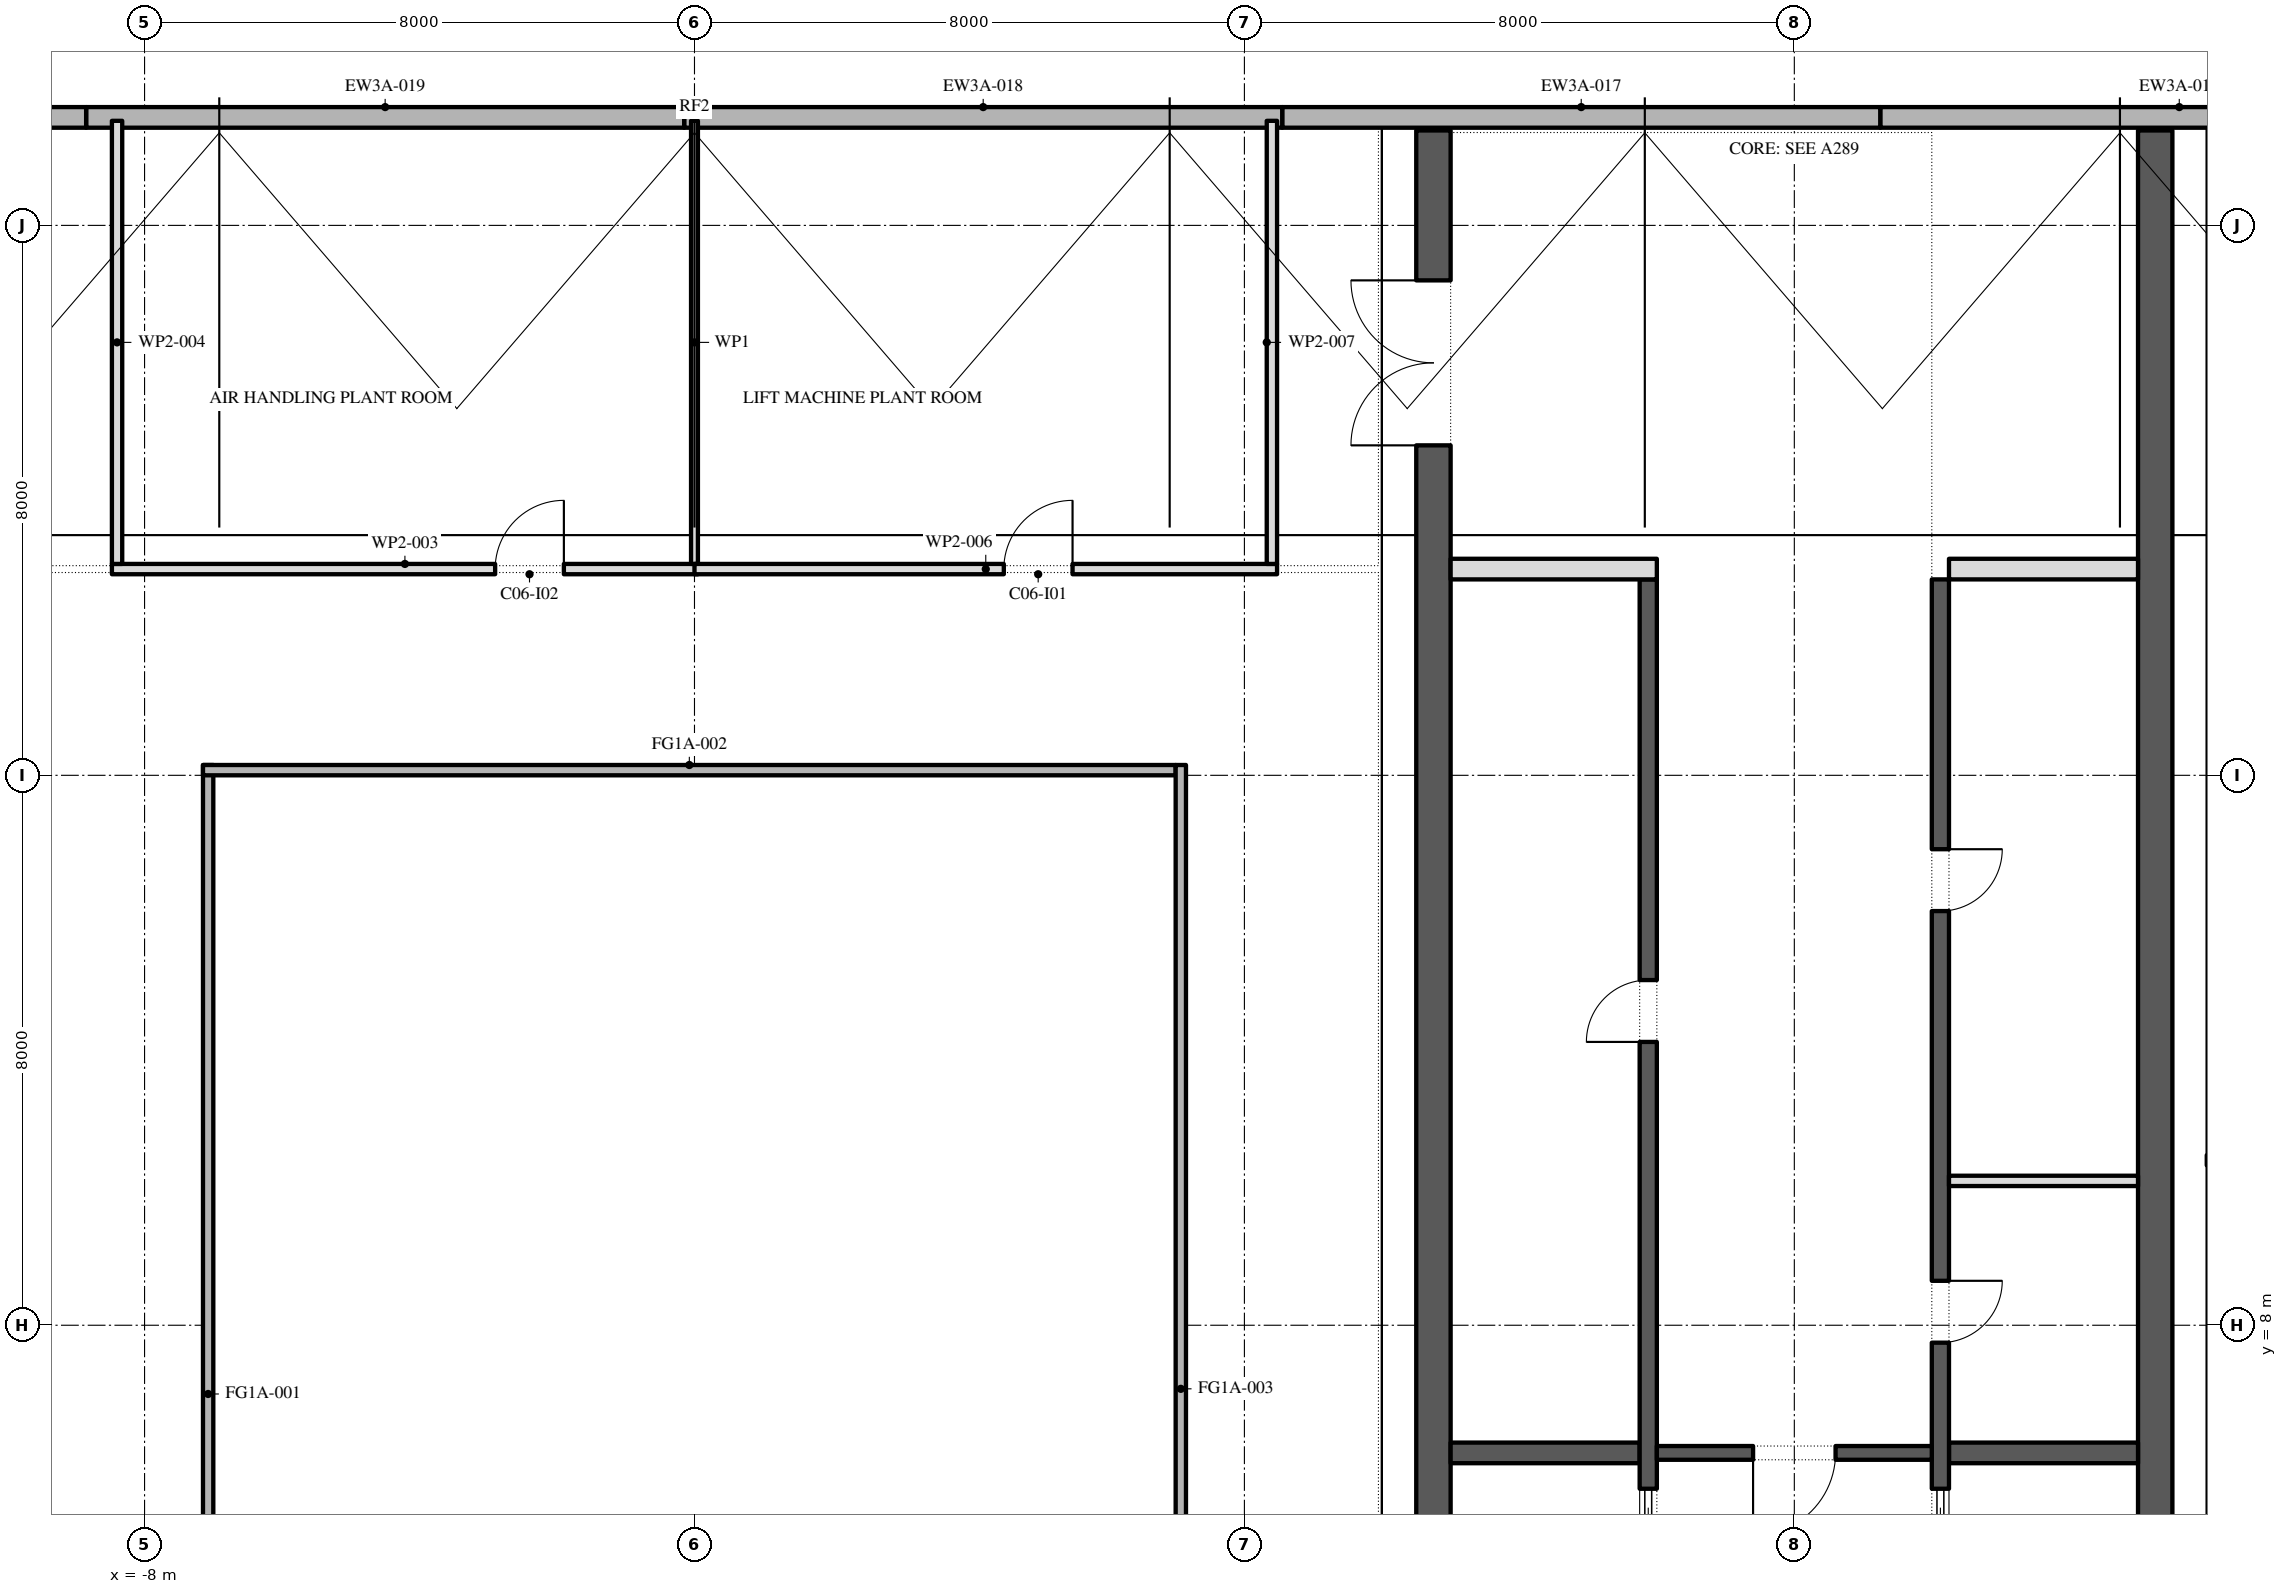
"""IFC4 building model, lengths in metres.
Left out: names, types, materials, properties, quantities, classifications, styles, units other than length and angle.
Written with IfcOpenShell. Run it as: python <this file> out.ifc"""

import sys

from ifc_helpers import new_model, si_unit, direction, frame, frame_2d, origin, place, context, subcontext, project, spatial, polyline, rectangle, outline, extrude, element, fill, save


model = new_model("IFC4")
c1 = context("Model", 3, precision=1e-05, world=origin(), true_north=direction((0.0, 1.0)))
c2 = subcontext(c1, "Body", "Model", "MODEL_VIEW")
j1 = project(units=[si_unit("LENGTHUNIT", "METRE"), si_unit("PLANEANGLEUNIT", "RADIAN")], contexts=[c1])
p1 = place(None, origin())
s1 = spatial("IfcSite", under=j1, at=p1, CompositionType="ELEMENT")
p2 = place(p1, origin())
s2 = spatial("IfcBuilding", under=s1, at=p2, CompositionType="ELEMENT")
p3 = place(p2, frame((0.0, 0.0, 390.0)))
s3 = spatial("IfcBuildingStorey", under=s2, at=p3, CompositionType="ELEMENT", Elevation=390.0)
p4 = place(p3, frame((-7.075, -2.15, 0.0), z_axis=(0.0, 0.0, 1.0), x_axis=(0.0, 1.0, 0.0)))
e1 = element("IfcWall", 1, at=p4, inside=s3, PredefinedType="STANDARD", context=c2, shape_type="SweptSolid", body=[
    extrude(rectangle(XDim=18.3, YDim=0.15, at=frame_2d((9.15, 0.0))), origin(), (0.0, 0.0, 1.0), 4.0),
])
p5 = place(p3, frame((-7.15, 16.075, 0.0), z_axis=(0.0, 0.0, 1.0), x_axis=(1.0, 0.0, 0.0)))
e2 = element("IfcWall", 2, at=p5, inside=s3, PredefinedType="STANDARD", context=c2, shape_type="SweptSolid", body=[
    extrude(rectangle(XDim=14.15, YDim=0.15, at=frame_2d((7.075, 0.0))), origin(), (0.0, 0.0, 1.0), 4.0),
])
p6 = place(p3, frame((7.075, 16.15, 0.0), z_axis=(0.0, 0.0, 1.0), x_axis=(0.0, -1.0, 0.0)))
e3 = element("IfcWall", 3, at=p6, inside=s3, PredefinedType="STANDARD", context=c2, shape_type="SweptSolid", body=[
    extrude(rectangle(XDim=18.15, YDim=0.15, at=frame_2d((9.075, 0.0))), origin(), (0.0, 0.0, 1.0), 4.0),
])
for number, where, z_axis, x_axis in (
    (4, (25.95, 25.571, 0.0), (0.0, 0.0, 1.0), (-1.0, 0.0, 0.0)),
    (5, (17.25, 25.571, 0.0), (0.0, 0.0, 1.0), (-1.0, 0.0, 0.0)),
    (6, (8.55, 25.571, 0.0), (0.0, 0.0, 1.0), (-1.0, 0.0, 0.0)),
):
    element("IfcWall", number, at=place(p3, frame(where, z_axis=z_axis, x_axis=x_axis)), inside=s3, PredefinedType="STANDARD", context=c2, shape_type="SweptSolid", body=[
        extrude(rectangle(XDim=8.7, YDim=0.3, at=frame_2d((4.35, 0.0))), origin(), (0.0, 0.0, 1.0), 2.2),
    ])
p7 = place(p3, frame((-0.15, 25.571, 0.0), z_axis=(0.0, 0.0, 1.0), x_axis=(-1.0, 0.0, 0.0)))
e7 = element("IfcWall", 7, at=p7, inside=s3, PredefinedType="STANDARD", context=c2, shape_type="SweptSolid", body=[
    extrude(rectangle(XDim=8.7, YDim=0.3, at=frame_2d((4.35, 0.0))), origin(), (0.0, 0.0, 1.0), 2.2),
])
p8 = place(p3, frame((-8.85, 25.571, 0.0), z_axis=(0.0, 0.0, 1.0), x_axis=(-1.0, 0.0, 0.0)))
e8 = element("IfcWall", 8, at=p8, inside=s3, PredefinedType="STANDARD", context=c2, shape_type="SweptSolid", body=[
    extrude(rectangle(XDim=8.7, YDim=0.3, at=frame_2d((4.35, 0.0))), origin(), (0.0, 0.0, 1.0), 2.2),
])
p9 = place(p3, frame((21.25, -2.45, 0.0), z_axis=(0.0, 0.0, 1.0), x_axis=(0.0, 1.0, 0.0)))
e9 = element("IfcWall", 9, at=p9, inside=s3, PredefinedType="SHEAR", context=c2, shape_type="SweptSolid", body=[
    extrude(outline(polyline([(0.0, 0.0), (27.831, 0.0), (27.831, 0.754), (23.018, 4.0), (0.0, 4.0), (0.0, 0.0)])), frame((0.0, 0.25, 0.0), z_axis=(0.0, -1.0, 0.0), x_axis=(1.0, 0.0, 0.0)), (0.0, 0.0, 1.0), 0.5),
])
p10 = place(p9, frame((5.05, 0.0, 0.0)))
e10 = element("IfcOpeningElement", 10, at=p10, cuts=e9, PredefinedType="OPENING", context=c2, shape_type="SweptSolid", body=[
    extrude(rectangle(XDim=1.2, YDim=2.1, at=frame_2d((0.6, 1.05))), frame((0.0, 0.26, 0.0), z_axis=(0.0, -1.0, 0.0), x_axis=(1.0, 0.0, 0.0)), (0.0, 0.0, 1.0), 0.52),
])
p11 = place(p3, frame((10.75, -2.45, 0.0), z_axis=(0.0, 0.0, 1.0), x_axis=(0.0, 1.0, 0.0)))
e11 = element("IfcWall", 11, at=p11, inside=s3, PredefinedType="SHEAR", context=c2, shape_type="SweptSolid", body=[
    extrude(outline(polyline([(0.0, 0.0), (27.831, 0.0), (27.831, 0.754), (23.018, 4.0), (0.0, 4.0), (0.0, 0.0)])), frame((0.0, 0.25, 0.0), z_axis=(0.0, -1.0, 0.0), x_axis=(1.0, 0.0, 0.0)), (0.0, 0.0, 1.0), 0.5),
])
p12 = place(p11, frame((23.25, 0.0, 0.0)))
e12 = element("IfcOpeningElement", 12, at=p12, cuts=e11, PredefinedType="OPENING", context=c2, shape_type="SweptSolid", body=[
    extrude(rectangle(XDim=2.4, YDim=2.1, at=frame_2d((1.2, 1.05))), frame((0.0, 0.26, 0.0), z_axis=(0.0, -1.0, 0.0), x_axis=(1.0, 0.0, 0.0)), (0.0, 0.0, 1.0), 0.52),
])
p13 = place(p11, frame((1.087, 0.0, 0.0)))
e13 = element("IfcOpeningElement", 13, at=p13, cuts=e11, PredefinedType="OPENING", context=c2, shape_type="SweptSolid", body=[
    extrude(rectangle(XDim=0.9, YDim=2.1, at=frame_2d((0.45, 1.05))), frame((0.0, 0.26, 0.0), z_axis=(0.0, -1.0, 0.0), x_axis=(1.0, 0.0, 0.0)), (0.0, 0.0, 1.0), 0.52),
])
p14 = place(p11, frame((4.262, 0.0, 0.0)))
e14 = element("IfcOpeningElement", 14, at=p14, cuts=e11, PredefinedType="OPENING", context=c2, shape_type="SweptSolid", body=[
    extrude(rectangle(XDim=1.0, YDim=2.1, at=frame_2d((0.5, 1.05))), frame((0.0, 0.26, 0.0), z_axis=(0.0, -1.0, 0.0), x_axis=(1.0, 0.0, 0.0)), (0.0, 0.0, 1.0), 0.52),
])
p15 = place(p3, frame((18.25, 6.143, 0.0), z_axis=(0.0, 0.0, 1.0), x_axis=(1.0, 0.0, 0.0)))
e15 = element("IfcWall", 15, at=p15, inside=s3, PredefinedType="SHEAR", context=c2, shape_type="SweptSolid", body=[
    extrude(rectangle(XDim=2.75, YDim=0.3, at=frame_2d((1.375, 0.0))), origin(), (0.0, 0.0, 1.0), 4.0),
])
p16 = place(p3, frame((18.125, 4.15, 0.0), z_axis=(0.0, 0.0, 1.0), x_axis=(0.0, 1.0, 0.0)))
e16 = element("IfcWall", 16, at=p16, inside=s3, PredefinedType="SHEAR", context=c2, shape_type="SweptSolid", body=[
    extrude(rectangle(XDim=14.7, YDim=0.25, at=frame_2d((7.35, 0.0))), origin(), (0.0, 0.0, 1.0), 4.0),
])
p17 = place(p16, frame((3.596, 0.0, 0.0)))
e17 = element("IfcOpeningElement", 17, at=p17, cuts=e16, PredefinedType="OPENING", context=c2, shape_type="SweptSolid", body=[
    extrude(rectangle(XDim=0.9, YDim=2.1, at=frame_2d((0.45, 1.05))), frame((0.0, 0.135, 0.0), z_axis=(0.0, -1.0, 0.0), x_axis=(1.0, 0.0, 0.0)), (0.0, 0.0, 1.0), 0.27),
])
p18 = place(p16, frame((9.875, 0.0, 0.0)))
e18 = element("IfcOpeningElement", 18, at=p18, cuts=e16, PredefinedType="OPENING", context=c2, shape_type="SweptSolid", body=[
    extrude(rectangle(XDim=0.9, YDim=2.1, at=frame_2d((0.45, 1.05))), frame((0.0, 0.135, 0.0), z_axis=(0.0, -1.0, 0.0), x_axis=(1.0, 0.0, 0.0)), (0.0, 0.0, 1.0), 0.27),
])
p19 = place(p16, frame((0.371, 0.0, 0.0)))
e19 = element("IfcOpeningElement", 19, at=p19, cuts=e16, PredefinedType="OPENING", context=c2, shape_type="SweptSolid", body=[
    extrude(rectangle(XDim=1.1, YDim=2.1, at=frame_2d((0.55, 1.05))), frame((0.0, 0.135, 0.0), z_axis=(0.0, -1.0, 0.0), x_axis=(1.0, 0.0, 0.0)), (0.0, 0.0, 1.0), 0.27),
])
p20 = place(p3, frame((18.25, 19.0, 0.0), z_axis=(0.0, 0.0, 1.0), x_axis=(1.0, 0.0, 0.0)))
e20 = element("IfcWall", 20, at=p20, inside=s3, PredefinedType="PARTITIONING", context=c2, shape_type="SweptSolid", body=[
    extrude(rectangle(XDim=2.75, YDim=0.3, at=frame_2d((1.375, 0.0))), origin(), (0.0, 0.0, 1.0), 4.0),
])
p21 = place(p3, frame((18.25, 10.1, 0.0), z_axis=(0.0, 0.0, 1.0), x_axis=(1.0, 0.0, 0.0)))
e21 = element("IfcWall", 21, at=p21, inside=s3, PredefinedType="PARTITIONING", context=c2, shape_type="SweptSolid", body=[
    extrude(rectangle(XDim=2.75, YDim=0.15, at=frame_2d((1.375, 0.0))), origin(), (0.0, 0.0, 1.0), 4.0),
])
p22 = place(p3, frame((11.0, 6.143, 0.0), z_axis=(0.0, 0.0, 1.0), x_axis=(1.0, 0.0, 0.0)))
e22 = element("IfcWall", 22, at=p22, inside=s3, PredefinedType="SHEAR", context=c2, shape_type="SweptSolid", body=[
    extrude(rectangle(XDim=2.75, YDim=0.3, at=frame_2d((1.375, 0.0))), origin(), (0.0, 0.0, 1.0), 4.0),
])
p23 = place(p3, frame((13.875, -2.45, 0.0), z_axis=(0.0, 0.0, 1.0), x_axis=(0.0, 1.0, 0.0)))
e23 = element("IfcWall", 23, at=p23, inside=s3, PredefinedType="SHEAR", context=c2, shape_type="SweptSolid", body=[
    extrude(rectangle(XDim=21.3, YDim=0.25, at=frame_2d((10.65, 0.0))), origin(), (0.0, 0.0, 1.0), 4.0),
])
p24 = place(p23, frame((14.571, 0.0, 0.0)))
e24 = element("IfcOpeningElement", 24, at=p24, cuts=e23, PredefinedType="OPENING", context=c2, shape_type="SweptSolid", body=[
    extrude(rectangle(XDim=0.9, YDim=2.1, at=frame_2d((0.45, 1.05))), frame((0.0, 0.135, 0.0), z_axis=(0.0, -1.0, 0.0), x_axis=(1.0, 0.0, 0.0)), (0.0, 0.0, 1.0), 0.27),
])
p25 = place(p23, frame((6.971, 0.0, 0.0)))
e25 = element("IfcOpeningElement", 25, at=p25, cuts=e23, PredefinedType="OPENING", context=c2, shape_type="SweptSolid", body=[
    extrude(rectangle(XDim=1.1, YDim=2.1, at=frame_2d((0.55, 1.05))), frame((0.0, 0.135, 0.0), z_axis=(0.0, -1.0, 0.0), x_axis=(1.0, 0.0, 0.0)), (0.0, 0.0, 1.0), 0.27),
])
p26 = place(p3, frame((11.0, 19.0, 0.0), z_axis=(0.0, 0.0, 1.0), x_axis=(1.0, 0.0, 0.0)))
e26 = element("IfcWall", 26, at=p26, inside=s3, PredefinedType="PARTITIONING", context=c2, shape_type="SweptSolid", body=[
    extrude(rectangle(XDim=3.0, YDim=0.3, at=frame_2d((1.5, 0.0))), origin(), (0.0, 0.0, 1.0), 4.0),
])
p27 = place(p3, frame((14.0, 6.143, 0.0), z_axis=(0.0, 0.0, 1.0), x_axis=(1.0, 0.0, 0.0)))
e27 = element("IfcWall", 27, at=p27, inside=s3, PredefinedType="SHEAR", context=c2, shape_type="SweptSolid", body=[
    extrude(rectangle(XDim=4.0, YDim=0.2, at=frame_2d((2.0, 0.0))), origin(), (0.0, 0.0, 1.0), 4.0),
])
p28 = place(p27, frame((1.4, 0.0, 0.0)))
e28 = element("IfcOpeningElement", 28, at=p28, cuts=e27, PredefinedType="OPENING", context=c2, shape_type="SweptSolid", body=[
    extrude(rectangle(XDim=1.2, YDim=2.1, at=frame_2d((0.6, 1.05))), frame((0.0, 0.11, 0.0), z_axis=(0.0, -1.0, 0.0), x_axis=(1.0, 0.0, 0.0)), (0.0, 0.0, 1.0), 0.22),
])
p29 = place(p3, frame((-8.475, 19.0, 0.0), z_axis=(0.0, 0.0, 1.0), x_axis=(1.0, 0.0, 0.0)))
e29 = element("IfcWall", 29, at=p29, inside=s3, PredefinedType="PARTITIONING", context=c2, shape_type="SweptSolid", body=[
    extrude(rectangle(XDim=8.525, YDim=0.15, at=frame_2d((4.263, 0.0))), origin(), (0.0, 0.0, 1.0), 4.0),
])
p30 = place(p29, frame((5.575, 0.0, 0.0)))
e30 = element("IfcOpeningElement", 30, at=p30, cuts=e29, PredefinedType="OPENING", context=c2, shape_type="SweptSolid", body=[
    extrude(rectangle(XDim=1.0, YDim=2.1, at=frame_2d((0.5, 1.05))), frame((0.0, 0.085, 0.0), z_axis=(0.0, -1.0, 0.0), x_axis=(1.0, 0.0, 0.0)), (0.0, 0.0, 1.0), 0.17),
])
p31 = place(p3, frame((-8.4, 25.521, 0.0), z_axis=(0.0, 0.0, 1.0), x_axis=(0.0, -1.0, 0.0)))
e31 = element("IfcWall", 31, at=p31, inside=s3, PredefinedType="PARTITIONING", context=c2, shape_type="SweptSolid", body=[
    extrude(rectangle(XDim=6.446, YDim=0.15, at=frame_2d((3.223, 0.0))), origin(), (0.0, 0.0, 1.0), 4.0),
])
p32 = place(p3, frame((0.0, 19.075, 0.0), z_axis=(0.0, 0.0, 1.0), x_axis=(0.0, 1.0, 0.0)))
e32 = element("IfcWall", 32, at=p32, inside=s3, PredefinedType="PARTITIONING", context=c2, shape_type="SweptSolid", body=[
    extrude(rectangle(XDim=6.446, YDim=0.1, at=frame_2d((3.223, 0.0))), origin(), (0.0, 0.0, 1.0), 4.0),
])
p33 = place(p3, frame((0.0, 19.0, 0.0), z_axis=(0.0, 0.0, 1.0), x_axis=(1.0, 0.0, 0.0)))
e33 = element("IfcWall", 33, at=p33, inside=s3, PredefinedType="PARTITIONING", context=c2, shape_type="SweptSolid", body=[
    extrude(rectangle(XDim=8.475, YDim=0.15, at=frame_2d((4.238, 0.0))), origin(), (0.0, 0.0, 1.0), 4.0),
])
p34 = place(p33, frame((4.5, 0.0, 0.0)))
e34 = element("IfcOpeningElement", 34, at=p34, cuts=e33, PredefinedType="OPENING", context=c2, shape_type="SweptSolid", body=[
    extrude(rectangle(XDim=1.0, YDim=2.1, at=frame_2d((0.5, 1.05))), frame((0.0, 0.085, 0.0), z_axis=(0.0, -1.0, 0.0), x_axis=(1.0, 0.0, 0.0)), (0.0, 0.0, 1.0), 0.17),
])
p35 = place(p3, frame((8.4, 19.075, 0.0), z_axis=(0.0, 0.0, 1.0), x_axis=(0.0, 1.0, 0.0)))
e35 = element("IfcWall", 35, at=p35, inside=s3, PredefinedType="PARTITIONING", context=c2, shape_type="SweptSolid", body=[
    extrude(rectangle(XDim=6.446, YDim=0.15, at=frame_2d((3.223, 0.0))), origin(), (0.0, 0.0, 1.0), 4.0),
])
p36 = place(p17, frame((0.9, -0.2, 0.0), z_axis=(0.0, 0.0, 1.0), x_axis=(-1.0, 0.0, 0.0)))
e36 = element("IfcDoor", 36, at=p36, inside=s3, OperationType="SINGLE_SWING_RIGHT", PredefinedType="DOOR", context=c2, shape_type="SweptSolid", body=[
    extrude(rectangle(XDim=0.9, YDim=2.1, at=frame_2d((0.45, 1.05))), frame((0.0, -0.075, 0.0), z_axis=(0.0, -1.0, 0.0), x_axis=(1.0, 0.0, 0.0)), (0.0, 0.0, 1.0), 0.05),
])
fill(e17, e36)
p37 = place(p18, frame((0.9, -0.2, 0.0), z_axis=(0.0, 0.0, 1.0), x_axis=(-1.0, 0.0, 0.0)))
e37 = element("IfcDoor", 37, at=p37, inside=s3, OperationType="SINGLE_SWING_RIGHT", PredefinedType="DOOR", context=c2, shape_type="SweptSolid", body=[
    extrude(rectangle(XDim=0.9, YDim=2.1, at=frame_2d((0.45, 1.05))), frame((0.0, -0.075, 0.0), z_axis=(0.0, -1.0, 0.0), x_axis=(1.0, 0.0, 0.0)), (0.0, 0.0, 1.0), 0.05),
])
fill(e18, e37)
p38 = place(p19, origin())
e38 = element("IfcDoor", 38, at=p38, inside=s3, OperationType="SLIDING_TO_LEFT", PredefinedType="DOOR", context=c2, shape_type="SweptSolid", body=[
    extrude(rectangle(XDim=1.1, YDim=2.1, at=frame_2d((0.55, 1.05))), frame((0.0, 0.025, 0.0), z_axis=(0.0, -1.0, 0.0), x_axis=(1.0, 0.0, 0.0)), (0.0, 0.0, 1.0), 0.05),
])
fill(e19, e38)
p39 = place(p24, origin())
e39 = element("IfcDoor", 39, at=p39, inside=s3, OperationType="SINGLE_SWING_RIGHT", PredefinedType="DOOR", context=c2, shape_type="SweptSolid", body=[
    extrude(rectangle(XDim=0.9, YDim=2.1, at=frame_2d((0.45, 1.05))), frame((0.0, 0.125, 0.0), z_axis=(0.0, -1.0, 0.0), x_axis=(1.0, 0.0, 0.0)), (0.0, 0.0, 1.0), 0.05),
])
fill(e24, e39)
p40 = place(p25, origin())
e40 = element("IfcDoor", 40, at=p40, inside=s3, OperationType="SLIDING_TO_LEFT", PredefinedType="DOOR", context=c2, shape_type="SweptSolid", body=[
    extrude(rectangle(XDim=1.1, YDim=2.1, at=frame_2d((0.55, 1.05))), frame((0.0, 0.025, 0.0), z_axis=(0.0, -1.0, 0.0), x_axis=(1.0, 0.0, 0.0)), (0.0, 0.0, 1.0), 0.05),
])
fill(e25, e40)
p41 = place(p28, frame((1.2, 0.0, 0.0), z_axis=(0.0, 0.0, 1.0), x_axis=(-1.0, 0.0, 0.0)))
e41 = element("IfcDoor", 41, at=p41, inside=s3, OperationType="SINGLE_SWING_LEFT", PredefinedType="DOOR", context=c2, shape_type="SweptSolid", body=[
    extrude(rectangle(XDim=1.2, YDim=2.1, at=frame_2d((0.6, 1.05))), frame((0.0, 0.025, 0.0), z_axis=(0.0, -1.0, 0.0), x_axis=(1.0, 0.0, 0.0)), (0.0, 0.0, 1.0), 0.05),
])
fill(e28, e41)
p42 = place(p12, origin())
e42 = element("IfcDoor", 42, at=p42, inside=s3, OperationType="DOUBLE_DOOR_SINGLE_SWING", PredefinedType="DOOR", context=c2, shape_type="SweptSolid", body=[
    extrude(rectangle(XDim=2.4, YDim=2.1, at=frame_2d((1.2, 1.05))), frame((0.0, 0.025, 0.0), z_axis=(0.0, -1.0, 0.0), x_axis=(1.0, 0.0, 0.0)), (0.0, 0.0, 1.0), 0.05),
])
fill(e12, e42)
p43 = place(p34, origin())
e43 = element("IfcDoor", 43, at=p43, inside=s3, OperationType="SINGLE_SWING_LEFT", PredefinedType="DOOR", context=c2, shape_type="SweptSolid", body=[
    extrude(rectangle(XDim=1.0, YDim=2.1, at=frame_2d((0.5, 1.05))), frame((0.0, 0.025, 0.0), z_axis=(0.0, -1.0, 0.0), x_axis=(1.0, 0.0, 0.0)), (0.0, 0.0, 1.0), 0.05),
])
fill(e34, e43)
p44 = place(p30, origin())
e44 = element("IfcDoor", 44, at=p44, inside=s3, OperationType="SINGLE_SWING_LEFT", PredefinedType="DOOR", context=c2, shape_type="SweptSolid", body=[
    extrude(rectangle(XDim=1.0, YDim=2.1, at=frame_2d((0.5, 1.05))), frame((0.0, 0.025, 0.0), z_axis=(0.0, -1.0, 0.0), x_axis=(1.0, 0.0, 0.0)), (0.0, 0.0, 1.0), 0.05),
])
fill(e30, e44)
save(model, sys.argv[1])
